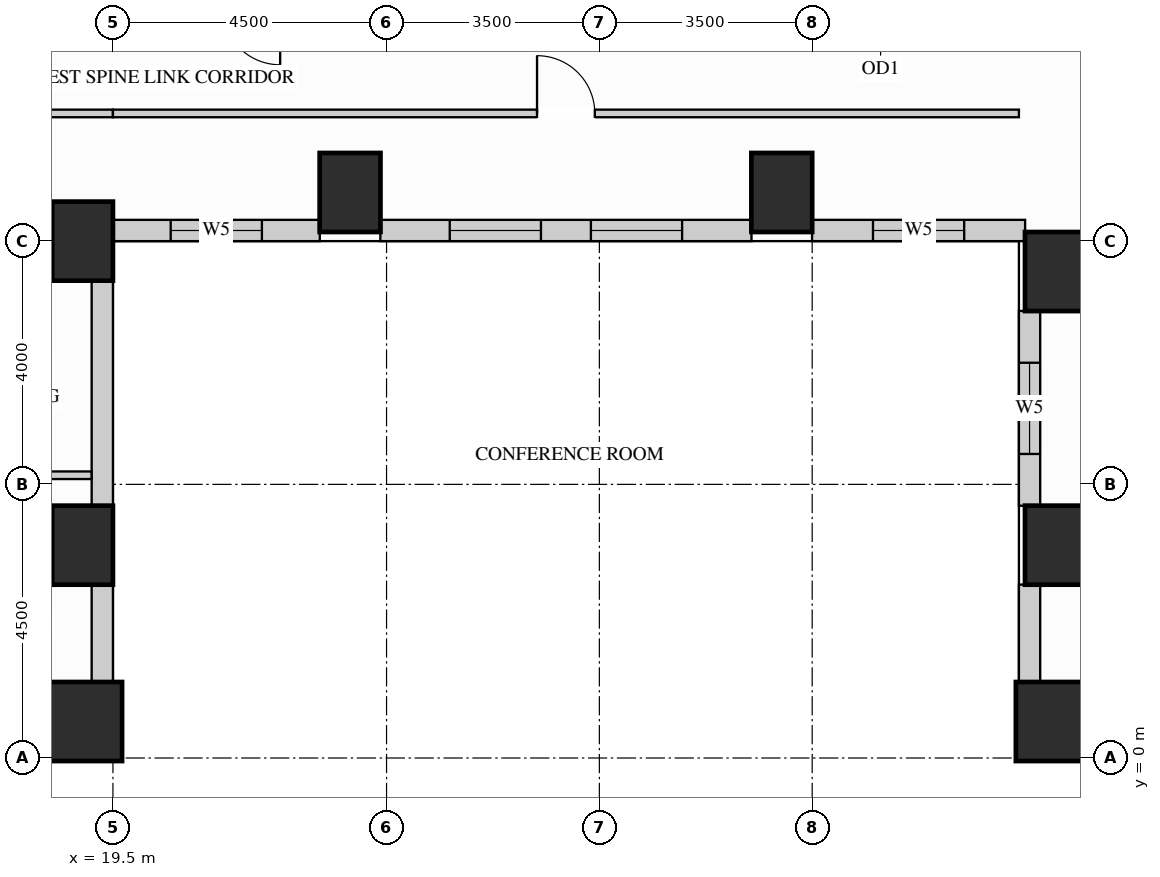
"""IFC4 building model, lengths in metres.
Left out: names, types, materials, properties, quantities, classifications, styles, units other than length and angle.
Written with IfcOpenShell. Run it as: python <this file> out.ifc"""

import sys

from ifc_helpers import new_model, si_unit, direction, frame, frame_2d, origin, origin_2d, place, context, subcontext, project, spatial, rectangle, extrude, source, transform, mapped, element, fill, save


model = new_model("IFC4")
c1 = context("Model", 3, precision=1e-05, world=origin(), true_north=direction((0.0, 1.0)))
c2 = subcontext(c1, "Body", "Model", "MODEL_VIEW")
j1 = project(units=[si_unit("LENGTHUNIT", "METRE"), si_unit("PLANEANGLEUNIT", "RADIAN")], contexts=[c1])
p1 = place(None, origin())
s1 = spatial("IfcSite", under=j1, at=p1, CompositionType="ELEMENT")
p2 = place(p1, origin())
s2 = spatial("IfcBuilding", under=s1, at=p2, CompositionType="ELEMENT")
p3 = place(p2, frame((0.0, 0.0, 65.7)))
s3 = spatial("IfcBuildingStorey", under=s2, at=p3, CompositionType="ELEMENT", Elevation=65.7)
m1 = source(origin(), c2, "Body", "SweptSolid", [
    extrude(rectangle(XDim=1.0, YDim=1.3, at=origin_2d()), origin(), (0.0, 0.0, 1.0), 3.38),
])
for number, where, z_axis, x_axis in (
    (1, (19.0, 3.5, 0.0), (0.0, 0.0, 1.0), (1.0, 0.0, 0.0)),
    (2, (19.0, 8.5, 0.0), (0.0, 0.0, 1.0), (1.0, 0.0, 0.0)),
    (3, (35.0, 3.5, 0.0), (0.0, 0.0, 1.0), (1.0, 0.0, 0.0)),
    (4, (35.0, 8.0, 0.0), (0.0, 0.0, 1.0), (1.0, 0.0, 0.0)),
    (5, (23.4, 9.3, 0.0), (0.0, 0.0, 1.0), (1.0, 0.0, 0.0)),
    (6, (30.5, 9.3, 0.0), (0.0, 0.0, 1.0), (1.0, 0.0, 0.0)),
):
    element("IfcColumn", number, at=place(p3, frame(where, z_axis=z_axis, x_axis=x_axis)), inside=s3, PredefinedType="COLUMN", context=c2, shape_type="MappedRepresentation", body=[
        mapped(m1, transform((0.0, 0.0, 0.0), x_axis=(1.0, 0.0, 0.0), y_axis=(0.0, 1.0, 0.0), z_axis=(0.0, 0.0, 1.0))),
    ])
m2 = source(origin(), c2, "Body", "SweptSolid", [
    extrude(rectangle(XDim=1.3, YDim=1.3, at=origin_2d()), origin(), (0.0, 0.0, 1.0), 3.38),
])
for number, where, z_axis, x_axis in (
    (7, (19.0, 0.6, 0.0), (0.0, 0.0, 1.0), (1.0, 0.0, 0.0)),
    (8, (35.0, 0.6, 0.0), (0.0, 0.0, 1.0), (1.0, 0.0, 0.0)),
):
    element("IfcColumn", number, at=place(p3, frame(where, z_axis=z_axis, x_axis=x_axis)), inside=s3, PredefinedType="COLUMN", context=c2, shape_type="MappedRepresentation", body=[
        mapped(m2, transform((0.0, 0.0, 0.0), x_axis=(1.0, 0.0, 0.0), y_axis=(0.0, 1.0, 0.0), z_axis=(0.0, 0.0, 1.0))),
    ])
m3 = source(origin(), c2, "Body", "SweptSolid", [
    extrude(rectangle(XDim=1.604, YDim=0.35, at=frame_2d((0.802, 0.0))), origin(), (0.0, 0.0, 1.0), 2.51),
])
p4 = place(p3, frame((19.325, 1.248, 0.0), z_axis=(0.0, 0.0, 1.0), x_axis=(0.0, 1.0, 0.0)))
e9 = element("IfcWall", 9, at=p4, inside=s3, PredefinedType="SOLIDWALL", context=c2, shape_type="MappedRepresentation", body=[
    mapped(m3, transform((0.0, 0.0, 0.0), x_axis=(1.0, 0.0, 0.0), y_axis=(0.0, 1.0, 0.0), z_axis=(0.0, 0.0, 1.0))),
])
m4 = source(origin(), c2, "Body", "SweptSolid", [
    extrude(rectangle(XDim=3.704, YDim=0.35, at=frame_2d((1.852, 0.0))), origin(), (0.0, 0.0, 1.0), 2.51),
])
p5 = place(p3, frame((19.325, 4.148, 0.0), z_axis=(0.0, 0.0, 1.0), x_axis=(0.0, 1.0, 0.0)))
e10 = element("IfcWall", 10, at=p5, inside=s3, PredefinedType="SOLIDWALL", context=c2, shape_type="MappedRepresentation", body=[
    mapped(m4, transform((0.0, 0.0, 0.0), x_axis=(1.0, 0.0, 0.0), y_axis=(0.0, 1.0, 0.0), z_axis=(0.0, 0.0, 1.0))),
])
p6 = place(p3, frame((19.498, 8.675, 0.0), z_axis=(0.0, 0.0, 1.0), x_axis=(1.0, 0.0, 0.0)))
e11 = element("IfcWall", 11, at=p6, inside=s3, PredefinedType="SOLIDWALL", context=c2, shape_type="SweptSolid", body=[
    extrude(rectangle(XDim=3.404, YDim=0.35, at=frame_2d((1.702, 0.0))), origin(), (0.0, 0.0, 1.0), 3.365),
])
p7 = place(p6, frame((0.952, 0.0, 0.78)))
e12 = element("IfcOpeningElement", 12, at=p7, cuts=e11, PredefinedType="OPENING", context=c2, shape_type="SweptSolid", body=[
    extrude(rectangle(XDim=1.5, YDim=2.0, at=frame_2d((0.75, 1.0))), frame((0.0, 0.185, 0.0), z_axis=(0.0, -1.0, 0.0), x_axis=(1.0, 0.0, 0.0)), (0.0, 0.0, 1.0), 0.37),
])
p8 = place(p3, frame((23.898, 8.675, 0.0), z_axis=(0.0, 0.0, 1.0), x_axis=(1.0, 0.0, 0.0)))
e13 = element("IfcWall", 13, at=p8, inside=s3, PredefinedType="SOLIDWALL", context=c2, shape_type="SweptSolid", body=[
    extrude(rectangle(XDim=6.104, YDim=0.35, at=frame_2d((3.052, 0.0))), origin(), (0.0, 0.0, 1.0), 3.365),
])
p9 = place(p8, frame((1.141, 0.0, 0.78)))
e14 = element("IfcOpeningElement", 14, at=p9, cuts=e13, PredefinedType="OPENING", context=c2, shape_type="SweptSolid", body=[
    extrude(rectangle(XDim=1.5, YDim=2.0, at=frame_2d((0.75, 1.0))), frame((0.0, 0.185, 0.0), z_axis=(0.0, -1.0, 0.0), x_axis=(1.0, 0.0, 0.0)), (0.0, 0.0, 1.0), 0.37),
])
p10 = place(p8, frame((3.463, 0.0, 0.78)))
e15 = element("IfcOpeningElement", 15, at=p10, cuts=e13, PredefinedType="OPENING", context=c2, shape_type="SweptSolid", body=[
    extrude(rectangle(XDim=1.5, YDim=2.0, at=frame_2d((0.75, 1.0))), frame((0.0, 0.185, 0.0), z_axis=(0.0, -1.0, 0.0), x_axis=(1.0, 0.0, 0.0)), (0.0, 0.0, 1.0), 0.37),
])
p11 = place(p3, frame((30.998, 8.675, 0.0), z_axis=(0.0, 0.0, 1.0), x_axis=(1.0, 0.0, 0.0)))
e16 = element("IfcWall", 16, at=p11, inside=s3, PredefinedType="SOLIDWALL", context=c2, shape_type="SweptSolid", body=[
    extrude(rectangle(XDim=3.504, YDim=0.35, at=frame_2d((1.752, 0.0))), origin(), (0.0, 0.0, 1.0), 3.365),
])
p12 = place(p11, frame((1.002, 0.0, 0.78)))
e17 = element("IfcOpeningElement", 17, at=p12, cuts=e16, PredefinedType="OPENING", context=c2, shape_type="SweptSolid", body=[
    extrude(rectangle(XDim=1.5, YDim=2.0, at=frame_2d((0.75, 1.0))), frame((0.0, 0.185, 0.0), z_axis=(0.0, -1.0, 0.0), x_axis=(1.0, 0.0, 0.0)), (0.0, 0.0, 1.0), 0.37),
])
p13 = place(p3, frame((34.575, 7.352, 0.0), z_axis=(0.0, 0.0, 1.0), x_axis=(0.0, -1.0, 0.0)))
e18 = element("IfcWall", 18, at=p13, inside=s3, PredefinedType="SOLIDWALL", context=c2, shape_type="SweptSolid", body=[
    extrude(rectangle(XDim=3.204, YDim=0.35, at=frame_2d((1.602, 0.0))), origin(), (0.0, 0.0, 1.0), 2.51),
])
p14 = place(p13, frame((0.852, 0.0, 0.78)))
e19 = element("IfcOpeningElement", 19, at=p14, cuts=e18, PredefinedType="OPENING", context=c2, shape_type="SweptSolid", body=[
    extrude(rectangle(XDim=1.5, YDim=1.55, at=frame_2d((0.75, 0.775))), frame((0.0, 0.185, 0.0), z_axis=(0.0, -1.0, 0.0), x_axis=(1.0, 0.0, 0.0)), (0.0, 0.0, 1.0), 0.37),
])
p15 = place(p3, frame((34.575, 2.852, 0.0), z_axis=(0.0, 0.0, 1.0), x_axis=(0.0, -1.0, 0.0)))
e20 = element("IfcWall", 20, at=p15, inside=s3, PredefinedType="SOLIDWALL", context=c2, shape_type="MappedRepresentation", body=[
    mapped(m3, transform((0.0, 0.0, 0.0), x_axis=(1.0, 0.0, 0.0), y_axis=(0.0, 1.0, 0.0), z_axis=(0.0, 0.0, 1.0))),
])
m5 = source(origin(), c2, "Body", "SweptSolid", [
    extrude(rectangle(XDim=2.95, YDim=0.125, at=frame_2d((1.475, 0.0))), origin(), (0.0, 0.0, 1.0), 3.365),
])
p16 = place(p3, frame((16.55, 10.6, 0.0), z_axis=(0.0, 0.0, 1.0), x_axis=(1.0, 0.0, 0.0)))
e21 = element("IfcWall", 21, at=p16, inside=s3, PredefinedType="PARTITIONING", context=c2, shape_type="MappedRepresentation", body=[
    mapped(m5, transform((0.0, 0.0, 0.0), x_axis=(1.0, 0.0, 0.0), y_axis=(0.0, 1.0, 0.0), z_axis=(0.0, 0.0, 1.0))),
])
p17 = place(p3, frame((19.5, 10.6, 0.0), z_axis=(0.0, 0.0, 1.0), x_axis=(1.0, 0.0, 0.0)))
e22 = element("IfcWall", 22, at=p17, inside=s3, PredefinedType="PARTITIONING", context=c2, shape_type="SweptSolid", body=[
    extrude(rectangle(XDim=14.9, YDim=0.125, at=frame_2d((7.45, 0.0))), origin(), (0.0, 0.0, 1.0), 3.365),
])
p18 = place(p17, frame((6.975, 0.0, 0.0)))
e23 = element("IfcOpeningElement", 23, at=p18, cuts=e22, PredefinedType="OPENING", context=c2, shape_type="SweptSolid", body=[
    extrude(rectangle(XDim=0.95, YDim=2.15, at=frame_2d((0.475, 1.075))), frame((0.0, 0.073, 0.0), z_axis=(0.0, -1.0, 0.0), x_axis=(1.0, 0.0, 0.0)), (0.0, 0.0, 1.0), 0.145),
])
m6 = source(origin(), c2, "Body", "SweptSolid", [
    extrude(rectangle(XDim=2.598, YDim=0.125, at=frame_2d((1.299, 0.0))), origin(), (0.0, 0.0, 1.0), 2.828),
])
p19 = place(p3, frame((16.55, 4.65, 0.0), z_axis=(0.0, 0.0, 1.0), x_axis=(1.0, 0.0, 0.0)))
e24 = element("IfcWall", 24, at=p19, inside=s3, PredefinedType="PARTITIONING", context=c2, shape_type="MappedRepresentation", body=[
    mapped(m6, transform((0.0, 0.0, 0.0), x_axis=(1.0, 0.0, 0.0), y_axis=(0.0, 1.0, 0.0), z_axis=(0.0, 0.0, 1.0))),
])
m7 = source(origin(), c2, "Body", "SweptSolid", [
    extrude(rectangle(XDim=0.95, YDim=2.15, at=frame_2d((0.475, 1.075))), frame((0.0, 0.025, 0.0), z_axis=(0.0, -1.0, 0.0), x_axis=(1.0, 0.0, 0.0)), (0.0, 0.0, 1.0), 0.05),
])
p20 = place(p18, origin())
e25 = element("IfcDoor", 25, at=p20, inside=s3, OperationType="SINGLE_SWING_LEFT", PredefinedType="DOOR", context=c2, shape_type="MappedRepresentation", body=[
    mapped(m7, transform((0.0, 0.0, 0.0), x_axis=(1.0, 0.0, 0.0), y_axis=(0.0, 1.0, 0.0), z_axis=(0.0, 0.0, 1.0))),
])
fill(e23, e25)
m8 = source(origin(), c2, "Body", "SweptSolid", [
    extrude(rectangle(XDim=1.5, YDim=2.0, at=frame_2d((0.75, 1.0))), frame((0.0, 0.03, 0.0), z_axis=(0.0, -1.0, 0.0), x_axis=(1.0, 0.0, 0.0)), (0.0, 0.0, 1.0), 0.06),
])
p21 = place(p7, origin())
e26 = element("IfcWindow", 26, at=p21, inside=s3, PartitioningType="SINGLE_PANEL", PredefinedType="WINDOW", context=c2, shape_type="MappedRepresentation", body=[
    mapped(m8, transform((0.0, 0.0, 0.0), x_axis=(1.0, 0.0, 0.0), y_axis=(0.0, 1.0, 0.0), z_axis=(0.0, 0.0, 1.0))),
])
fill(e12, e26)
p22 = place(p9, origin())
e27 = element("IfcWindow", 27, at=p22, inside=s3, PartitioningType="SINGLE_PANEL", PredefinedType="WINDOW", context=c2, shape_type="MappedRepresentation", body=[
    mapped(m8, transform((0.0, 0.0, 0.0), x_axis=(1.0, 0.0, 0.0), y_axis=(0.0, 1.0, 0.0), z_axis=(0.0, 0.0, 1.0))),
])
fill(e14, e27)
p23 = place(p10, origin())
e28 = element("IfcWindow", 28, at=p23, inside=s3, PartitioningType="SINGLE_PANEL", PredefinedType="WINDOW", context=c2, shape_type="MappedRepresentation", body=[
    mapped(m8, transform((0.0, 0.0, 0.0), x_axis=(1.0, 0.0, 0.0), y_axis=(0.0, 1.0, 0.0), z_axis=(0.0, 0.0, 1.0))),
])
fill(e15, e28)
p24 = place(p12, origin())
e29 = element("IfcWindow", 29, at=p24, inside=s3, PartitioningType="SINGLE_PANEL", PredefinedType="WINDOW", context=c2, shape_type="MappedRepresentation", body=[
    mapped(m8, transform((0.0, 0.0, 0.0), x_axis=(1.0, 0.0, 0.0), y_axis=(0.0, 1.0, 0.0), z_axis=(0.0, 0.0, 1.0))),
])
fill(e17, e29)
m9 = source(origin(), c2, "Body", "SweptSolid", [
    extrude(rectangle(XDim=1.5, YDim=1.55, at=frame_2d((0.75, 0.775))), frame((0.0, 0.03, 0.0), z_axis=(0.0, -1.0, 0.0), x_axis=(1.0, 0.0, 0.0)), (0.0, 0.0, 1.0), 0.06),
])
p25 = place(p14, origin())
e30 = element("IfcWindow", 30, at=p25, inside=s3, PartitioningType="SINGLE_PANEL", PredefinedType="WINDOW", context=c2, shape_type="MappedRepresentation", body=[
    mapped(m9, transform((0.0, 0.0, 0.0), x_axis=(1.0, 0.0, 0.0), y_axis=(0.0, 1.0, 0.0), z_axis=(0.0, 0.0, 1.0))),
])
fill(e19, e30)
save(model, sys.argv[1])
